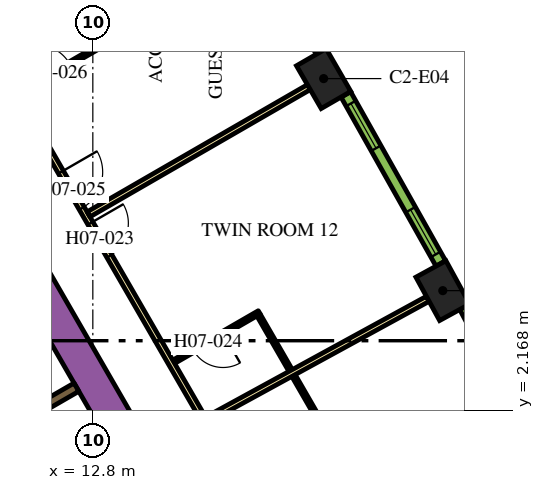
"""IFC4 building model, lengths in metres.
Left out: names, types, materials, properties, quantities, classifications, styles, units other than length and angle.
Written with IfcOpenShell. Run it as: python <this file> out.ifc"""

import sys

from ifc_helpers import new_model, si_unit, direction, frame, frame_2d, origin, origin_2d, place, context, subcontext, project, spatial, rectangle, extrude, element, fill, save


model = new_model("IFC4")
c1 = context("Model", 3, precision=1e-05, world=origin(), true_north=direction((0.0, 1.0)))
c2 = subcontext(c1, "Body", "Model", "MODEL_VIEW")
j1 = project(units=[si_unit("LENGTHUNIT", "METRE"), si_unit("PLANEANGLEUNIT", "RADIAN")], contexts=[c1])
p1 = place(None, origin())
s1 = spatial("IfcSite", under=j1, at=p1, CompositionType="ELEMENT")
p2 = place(p1, origin())
s2 = spatial("IfcBuilding", under=s1, at=p2, CompositionType="ELEMENT")
p3 = place(p2, frame((0.0, 0.0, 95.4)))
s3 = spatial("IfcBuildingStorey", under=s2, at=p3, CompositionType="ELEMENT", Elevation=95.4)
for number, where, z_axis, x_axis in (
    (1, (22.009, 5.317, 0.0), (0.0, 0.0, 1.0), (-0.48, 0.877, 0.0)),
    (2, (18.874, 10.897, 0.0), (0.0, 0.0, 1.0), (-0.5, 0.866, 0.0)),
):
    element("IfcColumn", number, at=place(p3, frame(where, z_axis=z_axis, x_axis=x_axis)), inside=s3, PredefinedType="COLUMN", context=c2, shape_type="SweptSolid", body=[
        extrude(rectangle(XDim=1.3, YDim=0.9, at=origin_2d()), origin(), (0.0, 0.0, 1.0), 3.9),
    ])
p4 = place(p3, frame((6.776, 13.364, 0.0), z_axis=(0.0, 0.0, 1.0), x_axis=(0.500004177138, -0.8660229921, 0.0)))
e3 = element("IfcWall", 3, at=p4, inside=s3, PredefinedType="SOLIDWALL", context=c2, shape_type="SweptSolid", body=[
    extrude(rectangle(XDim=20.204, YDim=0.9, at=frame_2d((10.102, 0.0))), origin(), (0.0, 0.0, 1.0), 3.9),
])
p5 = place(p3, frame((10.464, 1.677, 0.0), z_axis=(0.0, 0.0, 1.0), x_axis=(0.86605622881, 0.499946605688, 0.0)))
e4 = element("IfcWall", 4, at=p5, inside=s3, PredefinedType="SOLIDWALL", context=c2, shape_type="SweptSolid", body=[
    extrude(rectangle(XDim=2.2, YDim=0.25, at=frame_2d((1.1, 0.0))), origin(), (0.0, 0.0, 1.0), 3.9),
])
p6 = place(p3, frame((6.163, 18.475, 0.0), z_axis=(0.0, 0.0, 1.0), x_axis=(0.500001317485, -0.866024643133, 0.0)))
e5 = element("IfcWall", 5, at=p6, inside=s3, PredefinedType="PARTITIONING", context=c2, shape_type="SweptSolid", body=[
    extrude(rectangle(XDim=25.767, YDim=0.15, at=frame_2d((12.883, 0.0))), origin(), (0.0, 0.0, 1.0), 2.75),
])
p7 = place(p6, frame((24.241, 0.0, 0.0)))
e6 = element("IfcOpeningElement", 6, at=p7, cuts=e5, PredefinedType="OPENING", context=c2, shape_type="SweptSolid", body=[
    extrude(rectangle(XDim=1.0, YDim=2.1, at=frame_2d((0.5, 1.05))), frame((0.0, 0.085, 0.0), z_axis=(0.0, -1.0, 0.0), x_axis=(1.0, 0.0, 0.0)), (0.0, 0.0, 1.0), 0.17),
])
p8 = place(p6, frame((13.144, 0.0, 0.0)))
e7 = element("IfcOpeningElement", 7, at=p8, cuts=e5, PredefinedType="OPENING", context=c2, shape_type="SweptSolid", body=[
    extrude(rectangle(XDim=1.0, YDim=2.1, at=frame_2d((0.5, 1.05))), frame((0.0, 0.085, 0.0), z_axis=(0.0, -1.0, 0.0), x_axis=(1.0, 0.0, 0.0)), (0.0, 0.0, 1.0), 0.17),
])
p9 = place(p6, frame((11.592, 0.0, 0.0)))
e8 = element("IfcOpeningElement", 8, at=p9, cuts=e5, PredefinedType="OPENING", context=c2, shape_type="SweptSolid", body=[
    extrude(rectangle(XDim=1.1, YDim=2.1, at=frame_2d((0.55, 1.05))), frame((0.0, 0.085, 0.0), z_axis=(0.0, -1.0, 0.0), x_axis=(1.0, 0.0, 0.0)), (0.0, 0.0, 1.0), 0.17),
])
p10 = place(p6, frame((4.674, 0.0, 0.0)))
e9 = element("IfcOpeningElement", 9, at=p10, cuts=e5, PredefinedType="OPENING", context=c2, shape_type="SweptSolid", body=[
    extrude(rectangle(XDim=0.9, YDim=2.1, at=frame_2d((0.45, 1.05))), frame((0.0, 0.085, 0.0), z_axis=(0.0, -1.0, 0.0), x_axis=(1.0, 0.0, 0.0)), (0.0, 0.0, 1.0), 0.17),
])
p11 = place(p6, frame((2.411, 0.0, 0.0)))
e10 = element("IfcOpeningElement", 10, at=p11, cuts=e5, PredefinedType="OPENING", context=c2, shape_type="SweptSolid", body=[
    extrude(rectangle(XDim=1.0, YDim=2.1, at=frame_2d((0.5, 1.05))), frame((0.0, 0.085, 0.0), z_axis=(0.0, -1.0, 0.0), x_axis=(1.0, 0.0, 0.0)), (0.0, 0.0, 1.0), 0.17),
])
p12 = place(p3, frame((18.484, 10.672, 0.0), z_axis=(0.0, 0.0, 1.0), x_axis=(-0.866019162053, -0.50001081084, 0.0)))
e11 = element("IfcWall", 11, at=p12, inside=s3, PredefinedType="PARTITIONING", context=c2, shape_type="SweptSolid", body=[
    extrude(rectangle(XDim=6.694, YDim=0.15, at=frame_2d((3.347, 0.0))), origin(), (0.0, 0.0, 1.0), 2.75),
])
p13 = place(p3, frame((21.614, 5.102, 0.0), z_axis=(0.0, 0.0, 1.0), x_axis=(-0.877484555087, -0.479604895287, 0.0)))
e12 = element("IfcWall", 12, at=p13, inside=s3, PredefinedType="PARTITIONING", context=c2, shape_type="SweptSolid", body=[
    extrude(rectangle(XDim=6.611, YDim=0.15, at=frame_2d((3.306, 0.0))), origin(), (0.0, 0.0, 1.0), 2.75),
])
p14 = place(p3, frame((18.86, 1.734, 0.0), z_axis=(0.0, 0.0, 1.0), x_axis=(-0.500017819788, 0.86601511528, 0.0)))
e13 = element("IfcWall", 13, at=p14, inside=s3, PredefinedType="PARTITIONING", context=c2, shape_type="SweptSolid", body=[
    extrude(rectangle(XDim=1.55, YDim=0.1, at=frame_2d((0.775, 0.0))), origin(), (0.0, 0.0, 1.0), 2.75),
])
p15 = place(p3, frame((17.179, 4.745, 0.0), z_axis=(0.0, 0.0, 1.0), x_axis=(-0.866021400173, -0.500006934395, 0.0)))
e14 = element("IfcWall", 14, at=p15, inside=s3, PredefinedType="PARTITIONING", context=c2, shape_type="SweptSolid", body=[
    extrude(rectangle(XDim=2.6, YDim=0.1, at=frame_2d((1.3, 0.0))), origin(), (0.0, 0.0, 1.0), 2.75),
])
p16 = place(p15, frame((1.1, 0.0, 0.0)))
e15 = element("IfcOpeningElement", 15, at=p16, cuts=e14, PredefinedType="OPENING", context=c2, shape_type="SweptSolid", body=[
    extrude(rectangle(XDim=0.9, YDim=2.1, at=frame_2d((0.45, 1.05))), frame((0.0, 0.06, 0.0), z_axis=(0.0, -1.0, 0.0), x_axis=(1.0, 0.0, 0.0)), (0.0, 0.0, 1.0), 0.12),
])
p17 = place(p3, frame((17.161, 4.677, 0.0), z_axis=(0.0, 0.0, 1.0), x_axis=(0.499890179513, -0.866088799389, 0.0)))
e16 = element("IfcWall", 16, at=p17, inside=s3, PredefinedType="PARTITIONING", context=c2, shape_type="SweptSolid", body=[
    extrude(rectangle(XDim=1.68, YDim=0.1, at=frame_2d((0.84, 0.0))), origin(), (0.0, 0.0, 1.0), 2.75),
])
p18 = place(p3, frame((10.847, 10.513, 0.0), z_axis=(0.0, 0.0, 1.0), x_axis=(0.865996816683, 0.500049511043, 0.0)))
e17 = element("IfcWall", 17, at=p18, inside=s3, PredefinedType="PARTITIONING", context=c2, shape_type="SweptSolid", body=[
    extrude(rectangle(XDim=2.8, YDim=0.1, at=frame_2d((1.4, 0.0))), origin(), (0.0, 0.0, 1.0), 2.75),
])
p19 = place(p18, frame((0.55, 0.0, 0.0)))
e18 = element("IfcOpeningElement", 18, at=p19, cuts=e17, PredefinedType="OPENING", context=c2, shape_type="SweptSolid", body=[
    extrude(rectangle(XDim=1.0, YDim=2.1, at=frame_2d((0.5, 1.05))), frame((0.0, 0.06, 0.0), z_axis=(0.0, -1.0, 0.0), x_axis=(1.0, 0.0, 0.0)), (0.0, 0.0, 1.0), 0.12),
])
p20 = place(p3, frame((24.977, 0.383, 0.0), z_axis=(0.0, 0.0, 1.0), x_axis=(-0.469323203119, 0.883026461106, 0.0)))
e19 = element("IfcWall", 19, at=p20, inside=s3, PredefinedType="SOLIDWALL", context=c2, shape_type="SweptSolid", body=[
    extrude(rectangle(XDim=5.101, YDim=0.29, at=frame_2d((2.55, 0.0))), origin(), (0.0, 0.0, 1.0), 3.65),
])
p21 = place(p20, frame((0.273, 0.0, 0.9)))
e20 = element("IfcOpeningElement", 20, at=p21, cuts=e19, PredefinedType="OPENING", context=c2, shape_type="SweptSolid", body=[
    extrude(rectangle(XDim=1.35, YDim=2.15, at=frame_2d((0.675, 1.075))), frame((0.0, 0.155, 0.0), z_axis=(0.0, -1.0, 0.0), x_axis=(1.0, 0.0, 0.0)), (0.0, 0.0, 1.0), 0.31),
])
p22 = place(p20, frame((3.478, 0.0, 0.9)))
e21 = element("IfcOpeningElement", 21, at=p22, cuts=e19, PredefinedType="OPENING", context=c2, shape_type="SweptSolid", body=[
    extrude(rectangle(XDim=1.35, YDim=2.15, at=frame_2d((0.675, 1.075))), frame((0.0, 0.155, 0.0), z_axis=(0.0, -1.0, 0.0), x_axis=(1.0, 0.0, 0.0)), (0.0, 0.0, 1.0), 0.31),
])
p23 = place(p3, frame((21.956, 6.033, 0.0), z_axis=(0.0, 0.0, 1.0), x_axis=(-0.48983164787, 0.87181704316, 0.0)))
e22 = element("IfcWall", 22, at=p23, inside=s3, PredefinedType="SOLIDWALL", context=c2, shape_type="SweptSolid", body=[
    extrude(rectangle(XDim=5.1, YDim=0.29, at=frame_2d((2.55, 0.0))), origin(), (0.0, 0.0, 1.0), 3.65),
])
p24 = place(p23, frame((0.273, 0.0, 0.9)))
e23 = element("IfcOpeningElement", 23, at=p24, cuts=e22, PredefinedType="OPENING", context=c2, shape_type="SweptSolid", body=[
    extrude(rectangle(XDim=1.35, YDim=2.15, at=frame_2d((0.675, 1.075))), frame((0.0, 0.155, 0.0), z_axis=(0.0, -1.0, 0.0), x_axis=(1.0, 0.0, 0.0)), (0.0, 0.0, 1.0), 0.31),
])
p25 = place(p23, frame((3.478, 0.0, 0.9)))
e24 = element("IfcOpeningElement", 24, at=p25, cuts=e22, PredefinedType="OPENING", context=c2, shape_type="SweptSolid", body=[
    extrude(rectangle(XDim=1.35, YDim=2.15, at=frame_2d((0.675, 1.075))), frame((0.0, 0.155, 0.0), z_axis=(0.0, -1.0, 0.0), x_axis=(1.0, 0.0, 0.0)), (0.0, 0.0, 1.0), 0.31),
])
p26 = place(p3, frame((18.805, 11.611, 0.0), z_axis=(0.0, 0.0, 1.0), x_axis=(-0.510054281659, 0.860142214847, 0.0)))
e25 = element("IfcWall", 25, at=p26, inside=s3, PredefinedType="SOLIDWALL", context=c2, shape_type="SweptSolid", body=[
    extrude(rectangle(XDim=5.101, YDim=0.29, at=frame_2d((2.55, 0.0))), origin(), (0.0, 0.0, 1.0), 3.65),
])
p27 = place(p26, frame((0.273, 0.0, 0.9)))
e26 = element("IfcOpeningElement", 26, at=p27, cuts=e25, PredefinedType="OPENING", context=c2, shape_type="SweptSolid", body=[
    extrude(rectangle(XDim=1.35, YDim=2.15, at=frame_2d((0.675, 1.075))), frame((0.0, 0.155, 0.0), z_axis=(0.0, -1.0, 0.0), x_axis=(1.0, 0.0, 0.0)), (0.0, 0.0, 1.0), 0.31),
])
p28 = place(p26, frame((3.478, 0.0, 0.9)))
e27 = element("IfcOpeningElement", 27, at=p28, cuts=e25, PredefinedType="OPENING", context=c2, shape_type="SweptSolid", body=[
    extrude(rectangle(XDim=1.35, YDim=2.15, at=frame_2d((0.675, 1.075))), frame((0.0, 0.155, 0.0), z_axis=(0.0, -1.0, 0.0), x_axis=(1.0, 0.0, 0.0)), (0.0, 0.0, 1.0), 0.31),
])
p29 = place(p8, origin())
e28 = element("IfcDoor", 28, at=p29, inside=s3, OperationType="SINGLE_SWING_LEFT", PredefinedType="DOOR", context=c2, shape_type="SweptSolid", body=[
    extrude(rectangle(XDim=1.0, YDim=2.1, at=frame_2d((0.5, 1.05))), frame((0.0, 0.025, 0.0), z_axis=(0.0, -1.0, 0.0), x_axis=(1.0, 0.0, 0.0)), (0.0, 0.0, 1.0), 0.05),
])
fill(e7, e28)
p30 = place(p16, origin())
e29 = element("IfcDoor", 29, at=p30, inside=s3, OperationType="SINGLE_SWING_RIGHT", PredefinedType="DOOR", context=c2, shape_type="SweptSolid", body=[
    extrude(rectangle(XDim=0.9, YDim=2.1, at=frame_2d((0.45, 1.05))), frame((0.0, 0.025, 0.0), z_axis=(0.0, -1.0, 0.0), x_axis=(1.0, 0.0, 0.0)), (0.0, 0.0, 1.0), 0.05),
])
fill(e15, e29)
p31 = place(p9, origin())
e30 = element("IfcDoor", 30, at=p31, inside=s3, OperationType="SINGLE_SWING_RIGHT", PredefinedType="DOOR", context=c2, shape_type="SweptSolid", body=[
    extrude(rectangle(XDim=1.1, YDim=2.1, at=frame_2d((0.55, 1.05))), frame((0.0, 0.025, 0.0), z_axis=(0.0, -1.0, 0.0), x_axis=(1.0, 0.0, 0.0)), (0.0, 0.0, 1.0), 0.05),
])
fill(e8, e30)
p32 = place(p19, origin())
e31 = element("IfcDoor", 31, at=p32, inside=s3, OperationType="SINGLE_SWING_LEFT", PredefinedType="DOOR", context=c2, shape_type="SweptSolid", body=[
    extrude(rectangle(XDim=1.0, YDim=2.1, at=frame_2d((0.5, 1.05))), frame((0.0, 0.025, 0.0), z_axis=(0.0, -1.0, 0.0), x_axis=(1.0, 0.0, 0.0)), (0.0, 0.0, 1.0), 0.05),
])
fill(e18, e31)
p33 = place(p24, origin())
e32 = element("IfcWindow", 32, at=p33, inside=s3, PartitioningType="DOUBLE_PANEL_VERTICAL", PredefinedType="WINDOW", context=c2, shape_type="SweptSolid", body=[
    extrude(rectangle(XDim=1.35, YDim=2.15, at=frame_2d((0.675, 1.075))), frame((0.0, 0.015, 0.0), z_axis=(0.0, -1.0, 0.0), x_axis=(1.0, 0.0, 0.0)), (0.0, 0.0, 1.0), 0.06),
])
fill(e23, e32)
p34 = place(p25, origin())
e33 = element("IfcWindow", 33, at=p34, inside=s3, PartitioningType="DOUBLE_PANEL_VERTICAL", PredefinedType="WINDOW", context=c2, shape_type="SweptSolid", body=[
    extrude(rectangle(XDim=1.35, YDim=2.15, at=frame_2d((0.675, 1.075))), frame((0.0, 0.015, 0.0), z_axis=(0.0, -1.0, 0.0), x_axis=(1.0, 0.0, 0.0)), (0.0, 0.0, 1.0), 0.06),
])
fill(e24, e33)
save(model, sys.argv[1])
